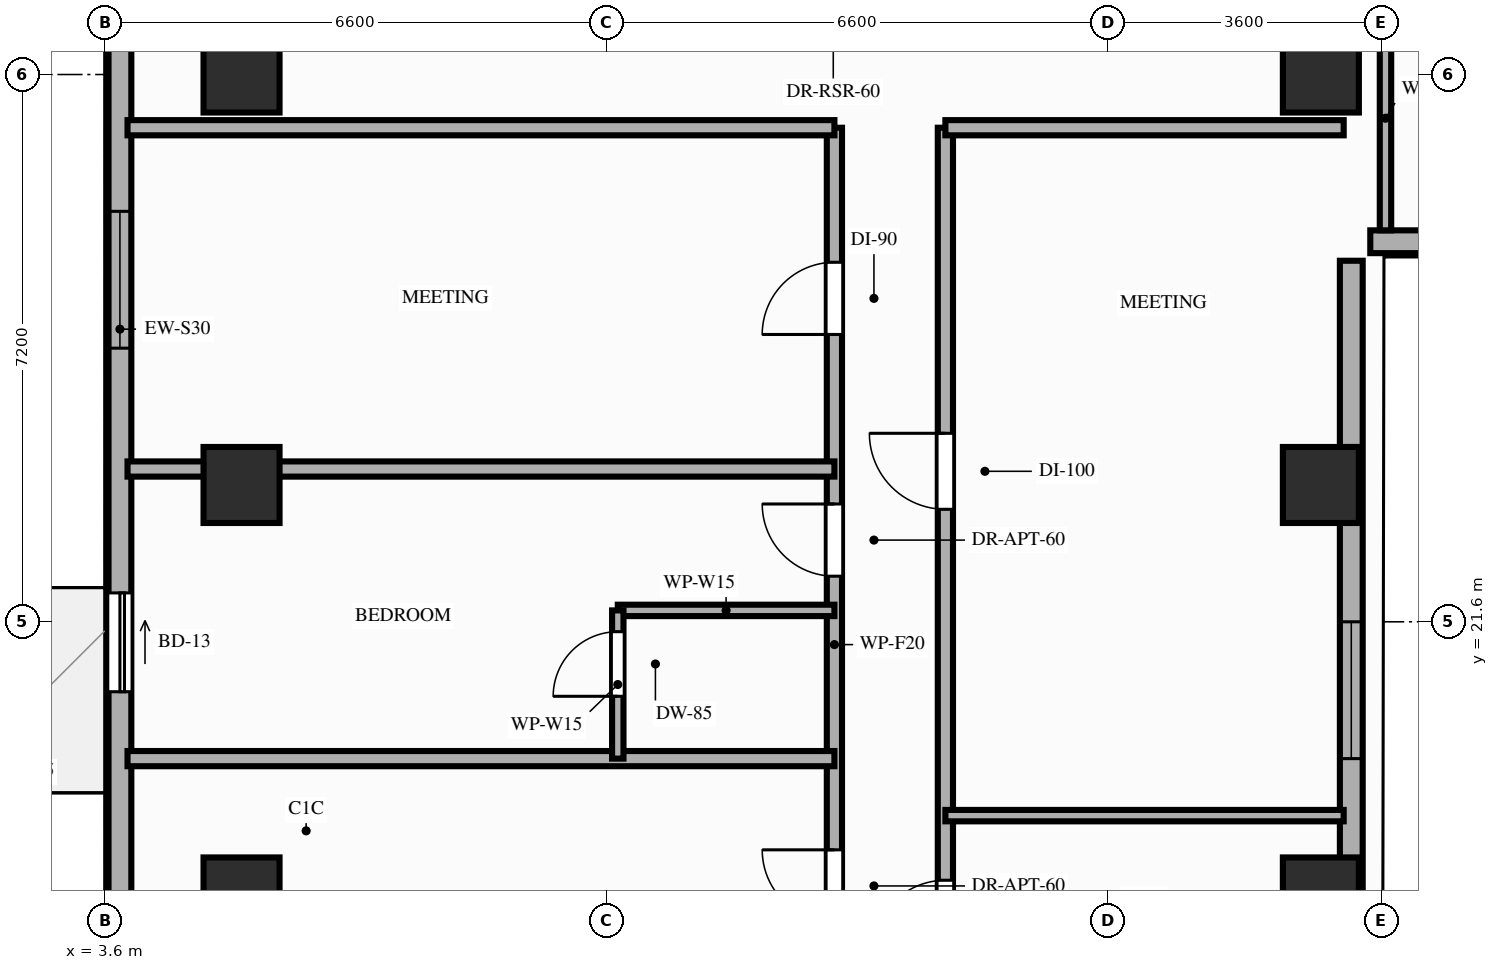
"""IFC4 building model, lengths in metres.
Left out: names, types, materials, properties, quantities, classifications, styles, units other than length and angle.
Written with IfcOpenShell. Run it as: python <this file> out.ifc"""

import sys

from ifc_helpers import new_model, si_unit, direction, frame, frame_2d, origin, origin_2d, place, context, subcontext, project, spatial, rectangle, extrude, element, fill, save


model = new_model("IFC4")
c1 = context("Model", 3, precision=1e-05, world=origin(), true_north=direction((0.0, 1.0)))
c2 = subcontext(c1, "Body", "Model", "MODEL_VIEW")
j1 = project(units=[si_unit("LENGTHUNIT", "METRE"), si_unit("PLANEANGLEUNIT", "RADIAN")], contexts=[c1])
p1 = place(None, origin())
s1 = spatial("IfcSite", under=j1, at=p1, CompositionType="ELEMENT")
p2 = place(p1, origin())
s2 = spatial("IfcBuilding", under=s1, at=p2, CompositionType="ELEMENT")
p3 = place(p2, frame((0.0, 0.0, 110.6)))
s3 = spatial("IfcBuildingStorey", under=s2, at=p3, CompositionType="ELEMENT", Elevation=110.6)
for number, where, z_axis, x_axis in (
    (1, (5.4, 18.0, 0.0), (0.0, 0.0, 1.0), (1.0, 0.0, 0.0)),
    (2, (19.6, 18.0, 0.0), (0.0, 0.0, 1.0), (1.0, 0.0, 0.0)),
    (3, (5.4, 23.4, 0.0), (0.0, 0.0, 1.0), (1.0, 0.0, 0.0)),
    (4, (19.6, 23.4, 0.0), (0.0, 0.0, 1.0), (1.0, 0.0, 0.0)),
    (5, (5.4, 28.8, 0.0), (0.0, 0.0, 1.0), (1.0, 0.0, 0.0)),
    (6, (19.6, 28.8, 0.0), (0.0, 0.0, 1.0), (1.0, 0.0, 0.0)),
):
    element("IfcColumn", number, at=place(p3, frame(where, z_axis=z_axis, x_axis=x_axis)), inside=s3, PredefinedType="COLUMN", context=c2, shape_type="SweptSolid", body=[
        extrude(rectangle(XDim=1.0, YDim=1.0, at=origin_2d()), origin(), (0.0, 0.0, 1.0), 3.2),
    ])
p4 = place(p3, frame((3.8, 42.1, 0.0), z_axis=(0.0, 0.0, 1.0), x_axis=(0.0, -1.0, 0.0)))
e7 = element("IfcWall", 7, at=p4, inside=s3, PredefinedType="STANDARD", context=c2, shape_type="SweptSolid", body=[
    extrude(rectangle(XDim=33.3, YDim=0.3, at=frame_2d((16.65, 0.0))), origin(), (0.0, 0.0, 1.0), 2.7),
])
p5 = place(p4, frame((20.12, 0.0, 0.0)))
e8 = element("IfcOpeningElement", 8, at=p5, cuts=e7, PredefinedType="OPENING", context=c2, shape_type="SweptSolid", body=[
    extrude(rectangle(XDim=1.3, YDim=2.08, at=frame_2d((0.65, 1.04))), frame((0.0, 0.16, 0.0), z_axis=(0.0, -1.0, 0.0), x_axis=(1.0, 0.0, 0.0)), (0.0, 0.0, 1.0), 0.32),
])
p6 = place(p4, frame((24.05, 0.0, 0.85)))
e9 = element("IfcOpeningElement", 9, at=p6, cuts=e7, PredefinedType="OPENING", context=c2, shape_type="SweptSolid", body=[
    extrude(rectangle(XDim=1.8, YDim=1.6, at=frame_2d((0.9, 0.8))), frame((0.0, 0.16, 0.0), z_axis=(0.0, -1.0, 0.0), x_axis=(1.0, 0.0, 0.0)), (0.0, 0.0, 1.0), 0.32),
])
p7 = place(p4, frame((29.48, 0.0, 0.85)))
e10 = element("IfcOpeningElement", 10, at=p7, cuts=e7, PredefinedType="OPENING", context=c2, shape_type="SweptSolid", body=[
    extrude(rectangle(XDim=1.8, YDim=1.6, at=frame_2d((0.9, 0.8))), frame((0.0, 0.16, 0.0), z_axis=(0.0, -1.0, 0.0), x_axis=(1.0, 0.0, 0.0)), (0.0, 0.0, 1.0), 0.32),
])
p8 = place(p4, frame((15.1, 0.0, 0.85)))
e11 = element("IfcOpeningElement", 11, at=p8, cuts=e7, PredefinedType="OPENING", context=c2, shape_type="SweptSolid", body=[
    extrude(rectangle(XDim=1.8, YDim=1.6, at=frame_2d((0.9, 0.8))), frame((0.0, 0.16, 0.0), z_axis=(0.0, -1.0, 0.0), x_axis=(1.0, 0.0, 0.0)), (0.0, 0.0, 1.0), 0.32),
])
p9 = place(p4, frame((9.9, 0.0, 0.85)))
e12 = element("IfcOpeningElement", 12, at=p9, cuts=e7, PredefinedType="OPENING", context=c2, shape_type="SweptSolid", body=[
    extrude(rectangle(XDim=1.8, YDim=1.6, at=frame_2d((0.9, 0.8))), frame((0.0, 0.16, 0.0), z_axis=(0.0, -1.0, 0.0), x_axis=(1.0, 0.0, 0.0)), (0.0, 0.0, 1.0), 0.32),
])
p10 = place(p4, frame((3.8, 0.0, 0.85)))
e13 = element("IfcOpeningElement", 13, at=p10, cuts=e7, PredefinedType="OPENING", context=c2, shape_type="SweptSolid", body=[
    extrude(rectangle(XDim=1.8, YDim=1.6, at=frame_2d((0.9, 0.8))), frame((0.0, 0.16, 0.0), z_axis=(0.0, -1.0, 0.0), x_axis=(1.0, 0.0, 0.0)), (0.0, 0.0, 1.0), 0.32),
])
p11 = place(p3, frame((20.0, 8.8, 0.0), z_axis=(0.0, 0.0, 1.0), x_axis=(0.0, 1.0, 0.0)))
e14 = element("IfcWall", 14, at=p11, inside=s3, PredefinedType="STANDARD", context=c2, shape_type="SweptSolid", body=[
    extrude(rectangle(XDim=17.55, YDim=0.3, at=frame_2d((8.775, 0.0))), origin(), (0.0, 0.0, 1.0), 2.4),
])
p12 = place(p11, frame((5.95, 0.0, 0.85)))
e15 = element("IfcOpeningElement", 15, at=p12, cuts=e14, PredefinedType="OPENING", context=c2, shape_type="SweptSolid", body=[
    extrude(rectangle(XDim=1.8, YDim=1.3, at=frame_2d((0.9, 0.65))), frame((0.0, 0.16, 0.0), z_axis=(0.0, -1.0, 0.0), x_axis=(1.0, 0.0, 0.0)), (0.0, 0.0, 1.0), 0.32),
])
p13 = place(p11, frame((11.0, 0.0, 0.85)))
e16 = element("IfcOpeningElement", 16, at=p13, cuts=e14, PredefinedType="OPENING", context=c2, shape_type="SweptSolid", body=[
    extrude(rectangle(XDim=1.8, YDim=1.3, at=frame_2d((0.9, 0.65))), frame((0.0, 0.16, 0.0), z_axis=(0.0, -1.0, 0.0), x_axis=(1.0, 0.0, 0.0)), (0.0, 0.0, 1.0), 0.32),
])
p14 = place(p3, frame((20.25, 26.6, 0.0), z_axis=(0.0, 0.0, 1.0), x_axis=(1.0, 0.0, 0.0)))
e17 = element("IfcWall", 17, at=p14, inside=s3, PredefinedType="STANDARD", context=c2, shape_type="SweptSolid", body=[
    extrude(rectangle(XDim=26.15, YDim=0.3, at=frame_2d((13.075, 0.0))), origin(), (0.0, 0.0, 1.0), 2.7),
])
p15 = place(p14, frame((8.0, 0.0, 0.0)))
e18 = element("IfcOpeningElement", 18, at=p15, cuts=e17, PredefinedType="OPENING", context=c2, shape_type="SweptSolid", body=[
    extrude(rectangle(XDim=1.3, YDim=2.08, at=frame_2d((0.65, 1.04))), frame((0.0, 0.16, 0.0), z_axis=(0.0, -1.0, 0.0), x_axis=(1.0, 0.0, 0.0)), (0.0, 0.0, 1.0), 0.32),
])
p16 = place(p14, frame((22.5, 0.0, 0.0)))
e19 = element("IfcOpeningElement", 19, at=p16, cuts=e17, PredefinedType="OPENING", context=c2, shape_type="SweptSolid", body=[
    extrude(rectangle(XDim=1.3, YDim=2.08, at=frame_2d((0.65, 1.04))), frame((0.0, 0.16, 0.0), z_axis=(0.0, -1.0, 0.0), x_axis=(1.0, 0.0, 0.0)), (0.0, 0.0, 1.0), 0.32),
])
p17 = place(p14, frame((2.25, 0.0, 0.85)))
e20 = element("IfcOpeningElement", 20, at=p17, cuts=e17, PredefinedType="OPENING", context=c2, shape_type="SweptSolid", body=[
    extrude(rectangle(XDim=1.8, YDim=1.6, at=frame_2d((0.9, 0.8))), frame((0.0, 0.16, 0.0), z_axis=(0.0, -1.0, 0.0), x_axis=(1.0, 0.0, 0.0)), (0.0, 0.0, 1.0), 0.32),
])
p18 = place(p14, frame((13.65, 0.0, 0.85)))
e21 = element("IfcOpeningElement", 21, at=p18, cuts=e17, PredefinedType="OPENING", context=c2, shape_type="SweptSolid", body=[
    extrude(rectangle(XDim=1.8, YDim=1.6, at=frame_2d((0.9, 0.8))), frame((0.0, 0.16, 0.0), z_axis=(0.0, -1.0, 0.0), x_axis=(1.0, 0.0, 0.0)), (0.0, 0.0, 1.0), 0.32),
])
p19 = place(p3, frame((13.2, 14.5, 0.0), z_axis=(0.0, 0.0, 1.0), x_axis=(0.0, 1.0, 0.0)))
e22 = element("IfcWall", 22, at=p19, inside=s3, PredefinedType="PARTITIONING", context=c2, shape_type="SweptSolid", body=[
    extrude(rectangle(XDim=13.6, YDim=0.2, at=frame_2d((6.8, 0.0))), origin(), (0.0, 0.0, 1.0), 2.4),
])
p20 = place(p19, frame((3.15, 0.0, 0.0)))
e23 = element("IfcOpeningElement", 23, at=p20, cuts=e22, PredefinedType="OPENING", context=c2, shape_type="SweptSolid", body=[
    extrude(rectangle(XDim=0.95, YDim=2.15, at=frame_2d((0.475, 1.075))), frame((0.0, 0.11, 0.0), z_axis=(0.0, -1.0, 0.0), x_axis=(1.0, 0.0, 0.0)), (0.0, 0.0, 1.0), 0.22),
])
p21 = place(p19, frame((7.7, 0.0, 0.0)))
e24 = element("IfcOpeningElement", 24, at=p21, cuts=e22, PredefinedType="OPENING", context=c2, shape_type="SweptSolid", body=[
    extrude(rectangle(XDim=0.95, YDim=2.15, at=frame_2d((0.475, 1.075))), frame((0.0, 0.11, 0.0), z_axis=(0.0, -1.0, 0.0), x_axis=(1.0, 0.0, 0.0)), (0.0, 0.0, 1.0), 0.22),
])
p22 = place(p19, frame((10.88, 0.0, 0.0)))
e25 = element("IfcOpeningElement", 25, at=p22, cuts=e22, PredefinedType="OPENING", context=c2, shape_type="SweptSolid", body=[
    extrude(rectangle(XDim=0.95, YDim=2.15, at=frame_2d((0.475, 1.075))), frame((0.0, 0.11, 0.0), z_axis=(0.0, -1.0, 0.0), x_axis=(1.0, 0.0, 0.0)), (0.0, 0.0, 1.0), 0.22),
])
p23 = place(p3, frame((14.66, 14.5, 0.0), z_axis=(0.0, 0.0, 1.0), x_axis=(0.0, 1.0, 0.0)))
e26 = element("IfcWall", 26, at=p23, inside=s3, PredefinedType="PARTITIONING", context=c2, shape_type="SweptSolid", body=[
    extrude(rectangle(XDim=13.6, YDim=0.2, at=frame_2d((6.8, 0.0))), origin(), (0.0, 0.0, 1.0), 2.4),
])
p24 = place(p23, frame((0.45, 0.0, 0.0)))
e27 = element("IfcOpeningElement", 27, at=p24, cuts=e26, PredefinedType="OPENING", context=c2, shape_type="SweptSolid", body=[
    extrude(rectangle(XDim=0.95, YDim=2.15, at=frame_2d((0.475, 1.075))), frame((0.0, 0.11, 0.0), z_axis=(0.0, -1.0, 0.0), x_axis=(1.0, 0.0, 0.0)), (0.0, 0.0, 1.0), 0.22),
])
p25 = place(p23, frame((2.75, 0.0, 0.0)))
e28 = element("IfcOpeningElement", 28, at=p25, cuts=e26, PredefinedType="OPENING", context=c2, shape_type="SweptSolid", body=[
    extrude(rectangle(XDim=0.95, YDim=2.1, at=frame_2d((0.475, 1.05))), frame((0.0, 0.11, 0.0), z_axis=(0.0, -1.0, 0.0), x_axis=(1.0, 0.0, 0.0)), (0.0, 0.0, 1.0), 0.22),
])
p26 = place(p23, frame((8.58, 0.0, 0.0)))
e29 = element("IfcOpeningElement", 29, at=p26, cuts=e26, PredefinedType="OPENING", context=c2, shape_type="SweptSolid", body=[
    extrude(rectangle(XDim=1.0, YDim=2.15, at=frame_2d((0.5, 1.075))), frame((0.0, 0.11, 0.0), z_axis=(0.0, -1.0, 0.0), x_axis=(1.0, 0.0, 0.0)), (0.0, 0.0, 1.0), 0.22),
])
p27 = place(p3, frame((3.9, 28.1, 0.0), z_axis=(0.0, 0.0, 1.0), x_axis=(1.0, 0.0, 0.0)))
e30 = element("IfcWall", 30, at=p27, inside=s3, PredefinedType="PARTITIONING", context=c2, shape_type="SweptSolid", body=[
    extrude(rectangle(XDim=9.3, YDim=0.2, at=frame_2d((4.65, 0.0))), origin(), (0.0, 0.0, 1.0), 2.4),
])
p28 = place(p3, frame((14.66, 28.1, 0.0), z_axis=(0.0, 0.0, 1.0), x_axis=(1.0, 0.0, 0.0)))
e31 = element("IfcWall", 31, at=p28, inside=s3, PredefinedType="PARTITIONING", context=c2, shape_type="SweptSolid", body=[
    extrude(rectangle(XDim=5.24, YDim=0.2, at=frame_2d((2.62, 0.0))), origin(), (0.0, 0.0, 1.0), 2.4),
])
p29 = place(p3, frame((20.45, 26.75, 0.0), z_axis=(0.0, 0.0, 1.0), x_axis=(0.0, 1.0, 0.0)))
e32 = element("IfcWall", 32, at=p29, inside=s3, PredefinedType="PARTITIONING", context=c2, shape_type="SweptSolid", body=[
    extrude(rectangle(XDim=2.95, YDim=0.15, at=frame_2d((1.475, 0.0))), origin(), (0.0, 0.0, 1.0), 2.4),
])
p30 = place(p3, frame((3.9, 19.8, 0.0), z_axis=(0.0, 0.0, 1.0), x_axis=(1.0, 0.0, 0.0)))
e33 = element("IfcWall", 33, at=p30, inside=s3, PredefinedType="PARTITIONING", context=c2, shape_type="SweptSolid", body=[
    extrude(rectangle(XDim=9.3, YDim=0.2, at=frame_2d((4.65, 0.0))), origin(), (0.0, 0.0, 1.0), 2.4),
])
p31 = place(p3, frame((10.35, 21.75, 0.0), z_axis=(0.0, 0.0, 1.0), x_axis=(1.0, 0.0, 0.0)))
e34 = element("IfcWall", 34, at=p31, inside=s3, PredefinedType="PARTITIONING", context=c2, shape_type="SweptSolid", body=[
    extrude(rectangle(XDim=2.85, YDim=0.15, at=frame_2d((1.425, 0.0))), origin(), (0.0, 0.0, 1.0), 2.6),
])
p32 = place(p3, frame((10.35, 19.8, 0.0), z_axis=(0.0, 0.0, 1.0), x_axis=(0.0, 1.0, 0.0)))
e35 = element("IfcWall", 35, at=p32, inside=s3, PredefinedType="PARTITIONING", context=c2, shape_type="SweptSolid", body=[
    extrude(rectangle(XDim=1.95, YDim=0.15, at=frame_2d((0.975, 0.0))), origin(), (0.0, 0.0, 1.0), 2.6),
])
p33 = place(p32, frame((0.82, 0.0, 0.0)))
e36 = element("IfcOpeningElement", 36, at=p33, cuts=e35, PredefinedType="OPENING", context=c2, shape_type="SweptSolid", body=[
    extrude(rectangle(XDim=0.85, YDim=2.1, at=frame_2d((0.425, 1.05))), frame((0.0, 0.085, 0.0), z_axis=(0.0, -1.0, 0.0), x_axis=(1.0, 0.0, 0.0)), (0.0, 0.0, 1.0), 0.17),
])
p34 = place(p3, frame((3.9, 23.61, 0.0), z_axis=(0.0, 0.0, 1.0), x_axis=(1.0, 0.0, 0.0)))
e37 = element("IfcWall", 37, at=p34, inside=s3, PredefinedType="PARTITIONING", context=c2, shape_type="SweptSolid", body=[
    extrude(rectangle(XDim=9.3, YDim=0.2, at=frame_2d((4.65, 0.0))), origin(), (0.0, 0.0, 1.0), 2.4),
])
p35 = place(p3, frame((14.66, 19.05, 0.0), z_axis=(0.0, 0.0, 1.0), x_axis=(1.0, 0.0, 0.0)))
e38 = element("IfcWall", 38, at=p35, inside=s3, PredefinedType="PARTITIONING", context=c2, shape_type="SweptSolid", body=[
    extrude(rectangle(XDim=5.24, YDim=0.15, at=frame_2d((2.62, 0.0))), origin(), (0.0, 0.0, 1.0), 2.4),
])
p36 = place(p5, origin())
e39 = element("IfcDoor", 39, at=p36, inside=s3, OperationType="SLIDING_TO_LEFT", PredefinedType="DOOR", context=c2, shape_type="SweptSolid", body=[
    extrude(rectangle(XDim=1.3, YDim=2.08, at=frame_2d((0.65, 1.04))), frame((0.0, 0.025, 0.0), z_axis=(0.0, -1.0, 0.0), x_axis=(1.0, 0.0, 0.0)), (0.0, 0.0, 1.0), 0.05),
])
fill(e8, e39)
p37 = place(p8, origin())
e40 = element("IfcWindow", 40, at=p37, inside=s3, PartitioningType="SINGLE_PANEL", PredefinedType="WINDOW", context=c2, shape_type="SweptSolid", body=[
    extrude(rectangle(XDim=1.8, YDim=1.6, at=frame_2d((0.9, 0.8))), frame((0.0, 0.03, 0.0), z_axis=(0.0, -1.0, 0.0), x_axis=(1.0, 0.0, 0.0)), (0.0, 0.0, 1.0), 0.06),
])
fill(e11, e40)
p38 = place(p13, origin())
e41 = element("IfcWindow", 41, at=p38, inside=s3, PartitioningType="SINGLE_PANEL", PredefinedType="WINDOW", context=c2, shape_type="SweptSolid", body=[
    extrude(rectangle(XDim=1.8, YDim=1.3, at=frame_2d((0.9, 0.65))), frame((0.0, 0.03, 0.0), z_axis=(0.0, -1.0, 0.0), x_axis=(1.0, 0.0, 0.0)), (0.0, 0.0, 1.0), 0.06),
])
fill(e16, e41)
p39 = place(p20, origin())
e42 = element("IfcDoor", 42, at=p39, inside=s3, OperationType="SINGLE_SWING_RIGHT", PredefinedType="DOOR", context=c2, shape_type="SweptSolid", body=[
    extrude(rectangle(XDim=0.95, YDim=2.15, at=frame_2d((0.475, 1.075))), frame((0.0, 0.025, 0.0), z_axis=(0.0, -1.0, 0.0), x_axis=(1.0, 0.0, 0.0)), (0.0, 0.0, 1.0), 0.05),
])
fill(e23, e42)
p40 = place(p33, origin())
e43 = element("IfcDoor", 43, at=p40, inside=s3, OperationType="SINGLE_SWING_LEFT", PredefinedType="DOOR", context=c2, shape_type="SweptSolid", body=[
    extrude(rectangle(XDim=0.85, YDim=2.1, at=frame_2d((0.425, 1.05))), frame((0.0, 0.025, 0.0), z_axis=(0.0, -1.0, 0.0), x_axis=(1.0, 0.0, 0.0)), (0.0, 0.0, 1.0), 0.05),
])
fill(e36, e43)
p41 = place(p21, origin())
e44 = element("IfcDoor", 44, at=p41, inside=s3, OperationType="SINGLE_SWING_RIGHT", PredefinedType="DOOR", context=c2, shape_type="SweptSolid", body=[
    extrude(rectangle(XDim=0.95, YDim=2.15, at=frame_2d((0.475, 1.075))), frame((0.0, 0.025, 0.0), z_axis=(0.0, -1.0, 0.0), x_axis=(1.0, 0.0, 0.0)), (0.0, 0.0, 1.0), 0.05),
])
fill(e24, e44)
p42 = place(p22, origin())
e45 = element("IfcDoor", 45, at=p42, inside=s3, OperationType="SINGLE_SWING_LEFT", PredefinedType="DOOR", context=c2, shape_type="SweptSolid", body=[
    extrude(rectangle(XDim=0.95, YDim=2.15, at=frame_2d((0.475, 1.075))), frame((0.0, 0.025, 0.0), z_axis=(0.0, -1.0, 0.0), x_axis=(1.0, 0.0, 0.0)), (0.0, 0.0, 1.0), 0.05),
])
fill(e25, e45)
p43 = place(p25, origin())
e46 = element("IfcDoor", 46, at=p43, inside=s3, OperationType="SINGLE_SWING_LEFT", PredefinedType="DOOR", context=c2, shape_type="SweptSolid", body=[
    extrude(rectangle(XDim=0.95, YDim=2.1, at=frame_2d((0.475, 1.05))), frame((0.0, 0.025, 0.0), z_axis=(0.0, -1.0, 0.0), x_axis=(1.0, 0.0, 0.0)), (0.0, 0.0, 1.0), 0.05),
])
fill(e28, e46)
p44 = place(p26, origin())
e47 = element("IfcDoor", 47, at=p44, inside=s3, OperationType="SINGLE_SWING_RIGHT", PredefinedType="DOOR", context=c2, shape_type="SweptSolid", body=[
    extrude(rectangle(XDim=1.0, YDim=2.15, at=frame_2d((0.5, 1.075))), frame((0.0, 0.025, 0.0), z_axis=(0.0, -1.0, 0.0), x_axis=(1.0, 0.0, 0.0)), (0.0, 0.0, 1.0), 0.05),
])
fill(e29, e47)
save(model, sys.argv[1])
